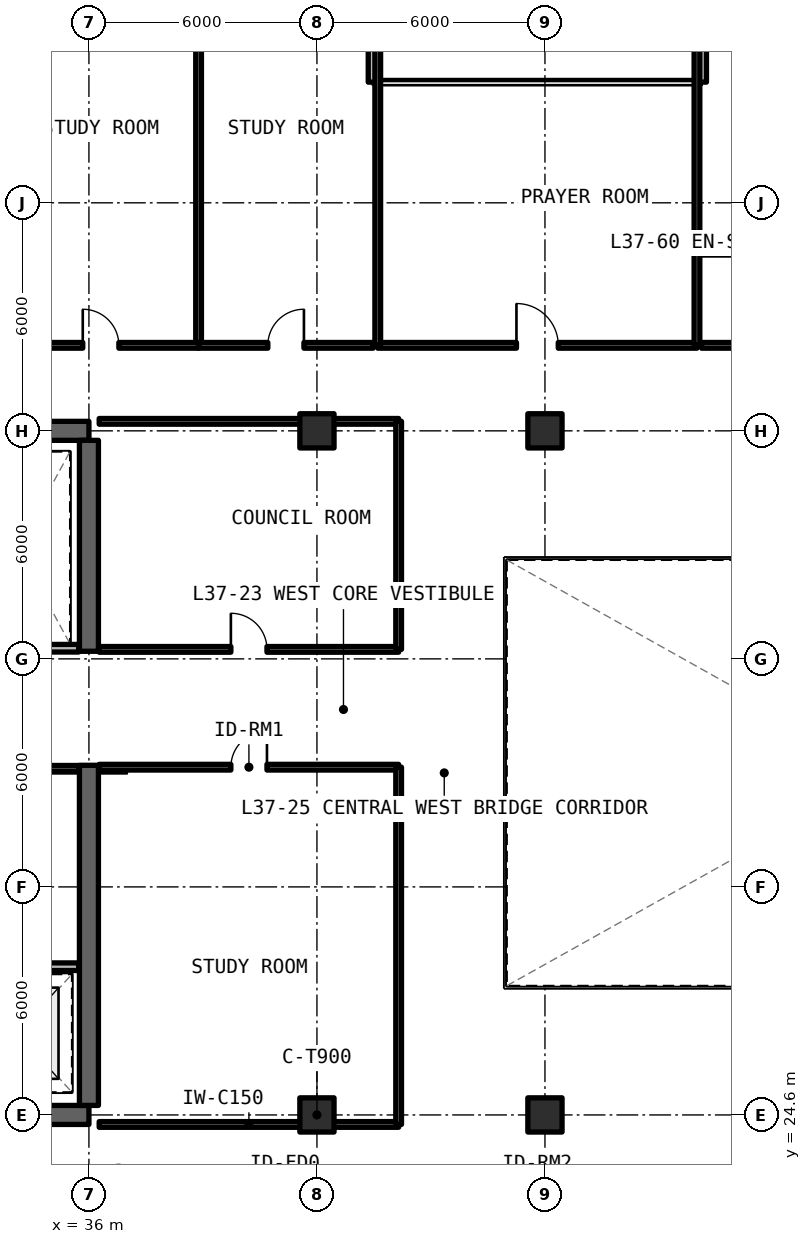
"""IFC4 building model, lengths in metres.
Left out: names, types, materials, properties, quantities, classifications, styles, units other than length and angle.
Written with IfcOpenShell. Run it as: python <this file> out.ifc"""

import sys

from ifc_helpers import new_model, si_unit, direction, frame, frame_2d, origin, origin_2d, place, context, subcontext, project, spatial, rectangle, extrude, element, fill, save


model = new_model("IFC4")
c1 = context("Model", 3, precision=1e-05, world=origin(), true_north=direction((0.0, 1.0)))
c2 = subcontext(c1, "Body", "Model", "MODEL_VIEW")
j1 = project(units=[si_unit("LENGTHUNIT", "METRE"), si_unit("PLANEANGLEUNIT", "RADIAN")], contexts=[c1])
p1 = place(None, origin())
s1 = spatial("IfcSite", under=j1, at=p1, CompositionType="ELEMENT")
p2 = place(p1, origin())
s2 = spatial("IfcBuilding", under=s1, at=p2, CompositionType="ELEMENT")
p3 = place(p2, frame((0.0, 0.0, 135.3)))
s3 = spatial("IfcBuildingStorey", under=s2, at=p3, CompositionType="ELEMENT", Elevation=135.3)
for number, where, z_axis, x_axis in (
    (1, (24.0, 24.6, 0.0), (0.0, 0.0, 1.0), (1.0, 0.0, 0.0)),
    (2, (36.0, 42.6, 0.0), (0.0, 0.0, 1.0), (-1.0, 0.0, 0.0)),
):
    element("IfcWall", number, at=place(p3, frame(where, z_axis=z_axis, x_axis=x_axis)), inside=s3, PredefinedType="SHEAR", context=c2, shape_type="SweptSolid", body=[
        extrude(rectangle(XDim=12.0, YDim=0.5, at=frame_2d((6.0, 0.0))), origin(), (0.0, 0.0, 1.0), 3.3),
    ])
p4 = place(p3, frame((36.0, 24.85, 0.0), z_axis=(0.0, 0.0, 1.0), x_axis=(0.0, 1.0, 0.0)))
e3 = element("IfcWall", 3, at=p4, inside=s3, PredefinedType="SHEAR", context=c2, shape_type="SweptSolid", body=[
    extrude(rectangle(XDim=8.95, YDim=0.5, at=frame_2d((4.475, 0.0))), origin(), (0.0, 0.0, 1.0), 3.3),
])
p5 = place(p3, frame((36.0, 36.8, 0.0), z_axis=(0.0, 0.0, 1.0), x_axis=(0.0, 1.0, 0.0)))
e4 = element("IfcWall", 4, at=p5, inside=s3, PredefinedType="SHEAR", context=c2, shape_type="SweptSolid", body=[
    extrude(rectangle(XDim=5.55, YDim=0.5, at=frame_2d((2.775, 0.0))), origin(), (0.0, 0.0, 1.0), 3.3),
])
for number, where, z_axis, x_axis in (
    (5, (42.0, 24.6, 0.0), (0.0, 0.0, 1.0), (1.0, 0.0, 0.0)),
    (6, (42.0, 42.6, 0.0), (0.0, 0.0, 1.0), (1.0, 0.0, 0.0)),
    (7, (48.0, 24.6, 0.0), (0.0, 0.0, 1.0), (1.0, 0.0, 0.0)),
    (8, (48.0, 42.6, 0.0), (0.0, 0.0, 1.0), (1.0, 0.0, 0.0)),
):
    element("IfcColumn", number, at=place(p3, frame(where, z_axis=z_axis, x_axis=x_axis)), inside=s3, PredefinedType="COLUMN", context=c2, shape_type="SweptSolid", body=[
        extrude(rectangle(XDim=0.9, YDim=0.9, at=origin_2d()), origin(), (0.0, 0.0, 1.0), 3.3),
    ])
for number, where, z_axis, x_axis in (
    (9, (52.125, 55.175, 0.0), (0.0, 0.0, 1.0), (0.0, -1.0, 0.0)),
    (10, (43.475, 51.775, 0.0), (0.0, 0.0, 1.0), (0.0, 1.0, 0.0)),
):
    element("IfcWall", number, at=place(p3, frame(where, z_axis=z_axis, x_axis=x_axis)), inside=s3, PredefinedType="SOLIDWALL", context=c2, shape_type="SweptSolid", body=[
        extrude(rectangle(XDim=3.4, YDim=0.25, at=frame_2d((1.7, 0.0))), origin(), (0.0, 0.0, 1.0), 3.08),
    ])
p6 = place(p3, frame((28.22, 28.5, 0.0), z_axis=(0.0, 0.0, 1.0), x_axis=(1.0, 0.0, 0.0)))
e11 = element("IfcWall", 11, at=p6, inside=s3, PredefinedType="SOLIDWALL", context=c2, shape_type="SweptSolid", body=[
    extrude(rectangle(XDim=7.51, YDim=0.2, at=frame_2d((3.755, 0.0))), origin(), (0.0, 0.0, 1.0), 2.35),
])
p7 = place(p6, frame((2.98, 0.0, 0.0)))
e12 = element("IfcOpeningElement", 12, at=p7, cuts=e11, PredefinedType="OPENING", context=c2, shape_type="SweptSolid", body=[
    extrude(rectangle(XDim=1.0, YDim=2.15, at=frame_2d((0.5, 1.075))), frame((0.0, 0.11, 0.0), z_axis=(0.0, -1.0, 0.0), x_axis=(1.0, 0.0, 0.0)), (0.0, 0.0, 1.0), 0.22),
])
p8 = place(p3, frame((32.68, 33.72, 0.0), z_axis=(0.0, 0.0, 1.0), x_axis=(1.0, 0.0, 0.0)))
e13 = element("IfcWall", 13, at=p8, inside=s3, PredefinedType="SOLIDWALL", context=c2, shape_type="SweptSolid", body=[
    extrude(rectangle(XDim=3.05, YDim=0.15, at=frame_2d((1.525, 0.0))), origin(), (0.0, 0.0, 1.0), 2.35),
])
p9 = place(p3, frame((32.68, 36.88, 0.0), z_axis=(0.0, 0.0, 1.0), x_axis=(1.0, 0.0, 0.0)))
e14 = element("IfcWall", 14, at=p9, inside=s3, PredefinedType="SOLIDWALL", context=c2, shape_type="SweptSolid", body=[
    extrude(rectangle(XDim=3.05, YDim=0.2, at=frame_2d((1.525, 0.0))), origin(), (0.0, 0.0, 1.0), 2.35),
])
p10 = place(p3, frame((36.27, 24.35, 0.0), z_axis=(0.0, 0.0, 1.0), x_axis=(1.0, 0.0, 0.0)))
e15 = element("IfcWall", 15, at=p10, inside=s3, PredefinedType="SOLIDWALL", context=c2, shape_type="SweptSolid", body=[
    extrude(rectangle(XDim=7.88, YDim=0.15, at=frame_2d((3.94, 0.0))), origin(), (0.0, 0.0, 1.0), 2.35),
])
p11 = place(p3, frame((36.27, 33.75, 0.0), z_axis=(0.0, 0.0, 1.0), x_axis=(1.0, 0.0, 0.0)))
e16 = element("IfcWall", 16, at=p11, inside=s3, PredefinedType="SOLIDWALL", context=c2, shape_type="SweptSolid", body=[
    extrude(rectangle(XDim=7.88, YDim=0.15, at=frame_2d((3.94, 0.0))), origin(), (0.0, 0.0, 1.0), 2.35),
])
p12 = place(p11, frame((3.465, 0.0, 0.0)))
e17 = element("IfcOpeningElement", 17, at=p12, cuts=e16, PredefinedType="OPENING", context=c2, shape_type="SweptSolid", body=[
    extrude(rectangle(XDim=0.95, YDim=2.15, at=frame_2d((0.475, 1.075))), frame((0.0, 0.085, 0.0), z_axis=(0.0, -1.0, 0.0), x_axis=(1.0, 0.0, 0.0)), (0.0, 0.0, 1.0), 0.17),
])
p13 = place(p3, frame((44.15, 24.35, 0.0), z_axis=(0.0, 0.0, 1.0), x_axis=(0.0, 1.0, 0.0)))
e18 = element("IfcWall", 18, at=p13, inside=s3, PredefinedType="SOLIDWALL", context=c2, shape_type="SweptSolid", body=[
    extrude(rectangle(XDim=9.4, YDim=0.15, at=frame_2d((4.7, 0.0))), origin(), (0.0, 0.0, 1.0), 2.35),
])
p14 = place(p3, frame((36.27, 36.85, 0.0), z_axis=(0.0, 0.0, 1.0), x_axis=(1.0, 0.0, 0.0)))
e19 = element("IfcWall", 19, at=p14, inside=s3, PredefinedType="SOLIDWALL", context=c2, shape_type="SweptSolid", body=[
    extrude(rectangle(XDim=7.88, YDim=0.15, at=frame_2d((3.94, 0.0))), origin(), (0.0, 0.0, 1.0), 2.35),
])
p15 = place(p14, frame((3.465, 0.0, 0.0)))
e20 = element("IfcOpeningElement", 20, at=p15, cuts=e19, PredefinedType="OPENING", context=c2, shape_type="SweptSolid", body=[
    extrude(rectangle(XDim=0.95, YDim=2.15, at=frame_2d((0.475, 1.075))), frame((0.0, 0.085, 0.0), z_axis=(0.0, -1.0, 0.0), x_axis=(1.0, 0.0, 0.0)), (0.0, 0.0, 1.0), 0.17),
])
p16 = place(p3, frame((36.27, 42.85, 0.0), z_axis=(0.0, 0.0, 1.0), x_axis=(1.0, 0.0, 0.0)))
e21 = element("IfcWall", 21, at=p16, inside=s3, PredefinedType="SOLIDWALL", context=c2, shape_type="SweptSolid", body=[
    extrude(rectangle(XDim=7.88, YDim=0.15, at=frame_2d((3.94, 0.0))), origin(), (0.0, 0.0, 1.0), 2.35),
])
p17 = place(p3, frame((44.15, 36.85, 0.0), z_axis=(0.0, 0.0, 1.0), x_axis=(0.0, 1.0, 0.0)))
e22 = element("IfcWall", 22, at=p17, inside=s3, PredefinedType="SOLIDWALL", context=c2, shape_type="SweptSolid", body=[
    extrude(rectangle(XDim=6.0, YDim=0.15, at=frame_2d((3.0, 0.0))), origin(), (0.0, 0.0, 1.0), 2.35),
])
p18 = place(p3, frame((43.6, 44.85, 0.0), z_axis=(0.0, 0.0, 1.0), x_axis=(1.0, 0.0, 0.0)))
e23 = element("IfcWall", 23, at=p18, inside=s3, PredefinedType="SOLIDWALL", context=c2, shape_type="SweptSolid", body=[
    extrude(rectangle(XDim=8.4, YDim=0.15, at=frame_2d((4.2, 0.0))), origin(), (0.0, 0.0, 1.0), 2.35),
])
p19 = place(p18, frame((3.65, 0.0, 0.0)))
e24 = element("IfcOpeningElement", 24, at=p19, cuts=e23, PredefinedType="OPENING", context=c2, shape_type="SweptSolid", body=[
    extrude(rectangle(XDim=1.1, YDim=2.15, at=frame_2d((0.55, 1.075))), frame((0.0, 0.085, 0.0), z_axis=(0.0, -1.0, 0.0), x_axis=(1.0, 0.0, 0.0)), (0.0, 0.0, 1.0), 0.17),
])
for number, where, z_axis, x_axis in (
    (25, (43.6, 44.85, 0.0), (0.0, 0.0, 1.0), (0.0, 1.0, 0.0)),
    (26, (52.0, 44.85, 0.0), (0.0, 0.0, 1.0), (0.0, 1.0, 0.0)),
    (27, (38.886, 44.85, 0.0), (0.0, 0.0, 1.0), (0.0, 1.0, 0.0)),
):
    element("IfcWall", number, at=place(p3, frame(where, z_axis=z_axis, x_axis=x_axis)), inside=s3, PredefinedType="SOLIDWALL", context=c2, shape_type="SweptSolid", body=[
        extrude(rectangle(XDim=10.2, YDim=0.15, at=frame_2d((5.1, 0.0))), origin(), (0.0, 0.0, 1.0), 2.35),
    ])
p20 = place(p3, frame((33.74, 44.85, 0.0), z_axis=(0.0, 0.0, 1.0), x_axis=(1.0, 0.0, 0.0)))
e28 = element("IfcWall", 28, at=p20, inside=s3, PredefinedType="SOLIDWALL", context=c2, shape_type="SweptSolid", body=[
    extrude(rectangle(XDim=5.146, YDim=0.15, at=frame_2d((2.573, 0.0))), origin(), (0.0, 0.0, 1.0), 2.35),
])
p21 = place(p20, frame((2.098, 0.0, 0.0)))
e29 = element("IfcOpeningElement", 29, at=p21, cuts=e28, PredefinedType="OPENING", context=c2, shape_type="SweptSolid", body=[
    extrude(rectangle(XDim=0.95, YDim=2.15, at=frame_2d((0.475, 1.075))), frame((0.0, 0.085, 0.0), z_axis=(0.0, -1.0, 0.0), x_axis=(1.0, 0.0, 0.0)), (0.0, 0.0, 1.0), 0.17),
])
p22 = place(p3, frame((38.886, 44.85, 0.0), z_axis=(0.0, 0.0, 1.0), x_axis=(1.0, 0.0, 0.0)))
e30 = element("IfcWall", 30, at=p22, inside=s3, PredefinedType="SOLIDWALL", context=c2, shape_type="SweptSolid", body=[
    extrude(rectangle(XDim=4.594, YDim=0.15, at=frame_2d((2.297, 0.0))), origin(), (0.0, 0.0, 1.0), 2.35),
])
p23 = place(p22, frame((1.822, 0.0, 0.0)))
e31 = element("IfcOpeningElement", 31, at=p23, cuts=e30, PredefinedType="OPENING", context=c2, shape_type="SweptSolid", body=[
    extrude(rectangle(XDim=0.95, YDim=2.15, at=frame_2d((0.475, 1.075))), frame((0.0, 0.085, 0.0), z_axis=(0.0, -1.0, 0.0), x_axis=(1.0, 0.0, 0.0)), (0.0, 0.0, 1.0), 0.17),
])
p24 = place(p3, frame((52.12, 47.3, 0.0), z_axis=(0.0, 0.0, 1.0), x_axis=(1.0, 0.0, 0.0)))
e32 = element("IfcWall", 32, at=p24, inside=s3, PredefinedType="PARTITIONING", context=c2, shape_type="SweptSolid", body=[
    extrude(rectangle(XDim=3.8, YDim=0.15, at=frame_2d((1.9, 0.0))), origin(), (0.0, 0.0, 1.0), 2.35),
])
p25 = place(p3, frame((52.12, 44.85, 0.0), z_axis=(0.0, 0.0, 1.0), x_axis=(1.0, 0.0, 0.0)))
e33 = element("IfcWall", 33, at=p25, inside=s3, PredefinedType="SOLIDWALL", context=c2, shape_type="SweptSolid", body=[
    extrude(rectangle(XDim=7.337, YDim=0.15, at=frame_2d((3.668, 0.0))), origin(), (0.0, 0.0, 1.0), 2.35),
])
p26 = place(p25, frame((5.134, 0.0, 0.0)))
e34 = element("IfcOpeningElement", 34, at=p26, cuts=e33, PredefinedType="OPENING", context=c2, shape_type="SweptSolid", body=[
    extrude(rectangle(XDim=0.95, YDim=2.15, at=frame_2d((0.475, 1.075))), frame((0.0, 0.085, 0.0), z_axis=(0.0, -1.0, 0.0), x_axis=(1.0, 0.0, 0.0)), (0.0, 0.0, 1.0), 0.17),
])
p27 = place(p12, origin())
e35 = element("IfcDoor", 35, at=p27, inside=s3, OperationType="SINGLE_SWING_RIGHT", PredefinedType="DOOR", context=c2, shape_type="SweptSolid", body=[
    extrude(rectangle(XDim=0.95, YDim=2.15, at=frame_2d((0.475, 1.075))), frame((0.0, 0.025, 0.0), z_axis=(0.0, -1.0, 0.0), x_axis=(1.0, 0.0, 0.0)), (0.0, 0.0, 1.0), 0.05),
])
fill(e17, e35)
p28 = place(p15, origin())
e36 = element("IfcDoor", 36, at=p28, inside=s3, OperationType="SINGLE_SWING_LEFT", PredefinedType="DOOR", context=c2, shape_type="SweptSolid", body=[
    extrude(rectangle(XDim=0.95, YDim=2.15, at=frame_2d((0.475, 1.075))), frame((0.0, 0.025, 0.0), z_axis=(0.0, -1.0, 0.0), x_axis=(1.0, 0.0, 0.0)), (0.0, 0.0, 1.0), 0.05),
])
fill(e20, e36)
p29 = place(p19, origin())
e37 = element("IfcDoor", 37, at=p29, inside=s3, OperationType="SINGLE_SWING_LEFT", PredefinedType="DOOR", context=c2, shape_type="SweptSolid", body=[
    extrude(rectangle(XDim=1.1, YDim=2.15, at=frame_2d((0.55, 1.075))), frame((0.0, 0.025, 0.0), z_axis=(0.0, -1.0, 0.0), x_axis=(1.0, 0.0, 0.0)), (0.0, 0.0, 1.0), 0.05),
])
fill(e24, e37)
p30 = place(p21, origin())
e38 = element("IfcDoor", 38, at=p30, inside=s3, OperationType="SINGLE_SWING_LEFT", PredefinedType="DOOR", context=c2, shape_type="SweptSolid", body=[
    extrude(rectangle(XDim=0.95, YDim=2.15, at=frame_2d((0.475, 1.075))), frame((0.0, 0.025, 0.0), z_axis=(0.0, -1.0, 0.0), x_axis=(1.0, 0.0, 0.0)), (0.0, 0.0, 1.0), 0.05),
])
fill(e29, e38)
p31 = place(p23, origin())
e39 = element("IfcDoor", 39, at=p31, inside=s3, OperationType="SINGLE_SWING_RIGHT", PredefinedType="DOOR", context=c2, shape_type="SweptSolid", body=[
    extrude(rectangle(XDim=0.95, YDim=2.15, at=frame_2d((0.475, 1.075))), frame((0.0, 0.025, 0.0), z_axis=(0.0, -1.0, 0.0), x_axis=(1.0, 0.0, 0.0)), (0.0, 0.0, 1.0), 0.05),
])
fill(e31, e39)
save(model, sys.argv[1])
